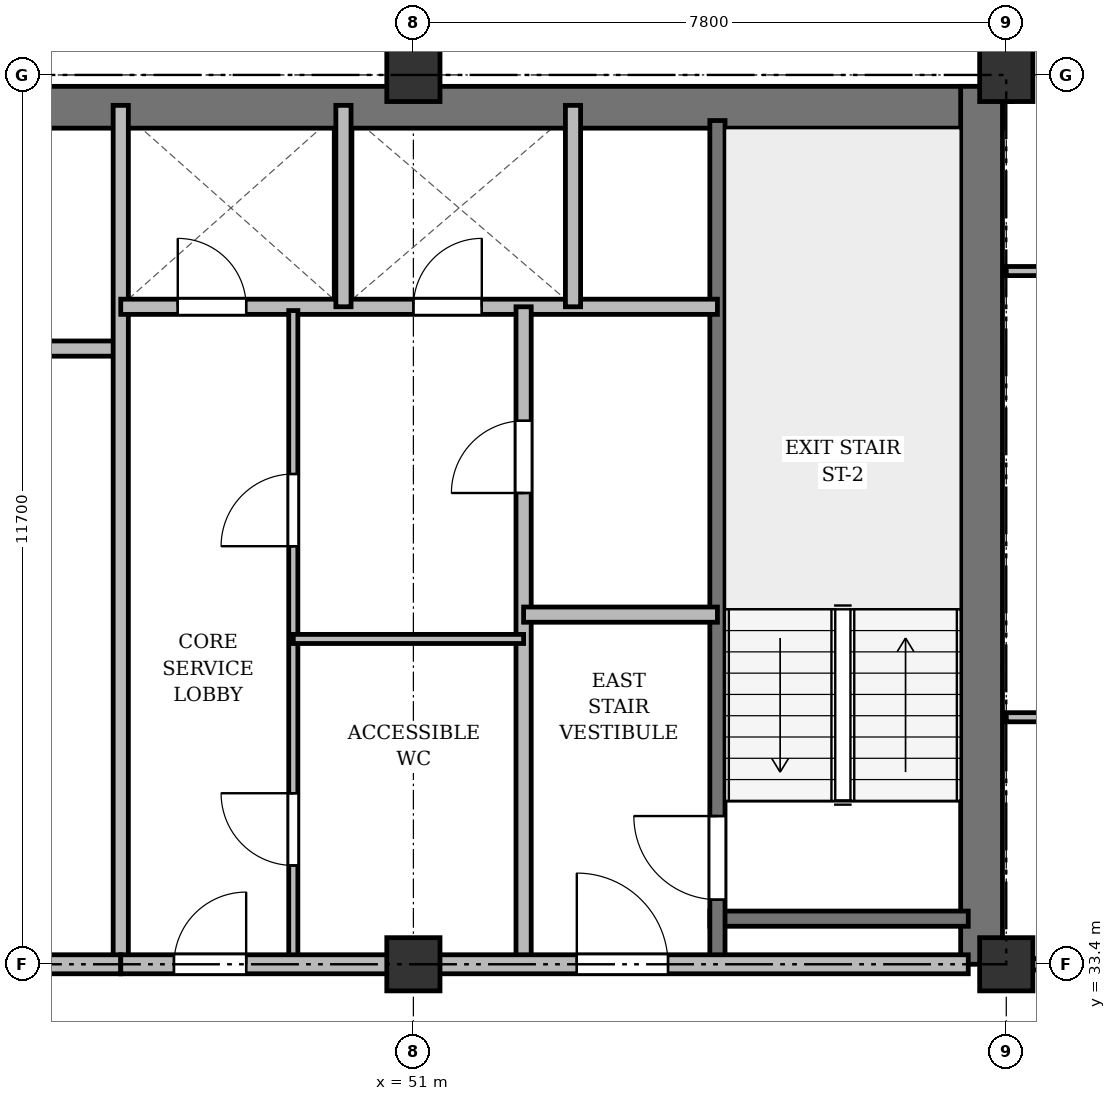
"""IFC4 building model, lengths in metres.
Left out: names, types, materials, properties, quantities, classifications, styles, units other than length and angle.
Written with IfcOpenShell. Run it as: python <this file> out.ifc"""

import sys

from ifc_helpers import new_model, si_unit, direction, frame, frame_2d, origin, origin_2d, place, context, subcontext, project, spatial, rectangle, extrude, source, transform, mapped, element, fill, save


model = new_model("IFC4")
c1 = context("Model", 3, precision=1e-05, world=origin(), true_north=direction((0.0, 1.0)))
c2 = subcontext(c1, "Body", "Model", "MODEL_VIEW")
j1 = project(units=[si_unit("LENGTHUNIT", "METRE"), si_unit("PLANEANGLEUNIT", "RADIAN")], contexts=[c1])
p1 = place(None, origin())
s1 = spatial("IfcSite", under=j1, at=p1, CompositionType="ELEMENT")
p2 = place(p1, origin())
s2 = spatial("IfcBuilding", under=s1, at=p2, CompositionType="ELEMENT")
p3 = place(p2, frame((0.0, 0.0, 160.9)))
s3 = spatial("IfcBuildingStorey", under=s2, at=p3, CompositionType="ELEMENT", Elevation=160.9)
m1 = source(origin(), c2, "Body", "SweptSolid", [
    extrude(rectangle(XDim=0.7, YDim=0.7, at=origin_2d()), origin(), (0.0, 0.0, 1.0), 3.6),
])
for number, where, z_axis, x_axis in (
    (1, (51.0, 33.4, 0.0), (0.0, 0.0, 1.0), (1.0, 0.0, 0.0)),
    (2, (51.0, 45.1, 0.0), (0.0, 0.0, 1.0), (1.0, 0.0, 0.0)),
    (3, (58.8, 33.4, 0.0), (0.0, 0.0, 1.0), (1.0, 0.0, 0.0)),
    (4, (58.8, 45.1, 0.0), (0.0, 0.0, 1.0), (1.0, 0.0, 0.0)),
):
    element("IfcColumn", number, at=place(p3, frame(where, z_axis=z_axis, x_axis=x_axis)), inside=s3, PredefinedType="COLUMN", context=c2, shape_type="MappedRepresentation", body=[
        mapped(m1, transform((0.0, 0.0, 0.0), x_axis=(1.0, 0.0, 0.0), y_axis=(0.0, 1.0, 0.0), z_axis=(0.0, 0.0, 1.0), scale=1.0)),
    ])
p4 = place(p3, frame((15.65, 44.675, 0.0), z_axis=(0.0, 0.0, 1.0), x_axis=(1.0, 0.0, 0.0)))
e5 = element("IfcWall", 5, at=p4, inside=s3, PredefinedType="SHEAR", context=c2, shape_type="SweptSolid", body=[
    extrude(rectangle(XDim=43.1, YDim=0.55, at=frame_2d((21.55, 0.0))), origin(), (0.0, 0.0, 1.0), 3.35),
])
p5 = place(p3, frame((58.475, 33.4, 0.0), z_axis=(0.0, 0.0, 1.0), x_axis=(0.0, 1.0, 0.0)))
e6 = element("IfcWall", 6, at=p5, inside=s3, PredefinedType="SHEAR", context=c2, shape_type="SweptSolid", body=[
    extrude(rectangle(XDim=11.55, YDim=0.55, at=frame_2d((5.775, 0.0))), origin(), (0.0, 0.0, 1.0), 3.35),
])
p6 = place(p3, frame((54.9, 34.0, 0.0), z_axis=(0.0, 0.0, 1.0), x_axis=(1.0, 0.0, 0.0)))
e7 = element("IfcWall", 7, at=p6, inside=s3, PredefinedType="SHEAR", context=c2, shape_type="SweptSolid", body=[
    extrude(rectangle(XDim=3.4, YDim=0.2, at=frame_2d((1.7, 0.0))), origin(), (0.0, 0.0, 1.0), 3.35),
])
p7 = place(p3, frame((55.0, 33.4, 0.0), z_axis=(0.0, 0.0, 1.0), x_axis=(0.0, 1.0, 0.0)))
e8 = element("IfcWall", 8, at=p7, inside=s3, PredefinedType="SHEAR", context=c2, shape_type="SweptSolid", body=[
    extrude(rectangle(XDim=11.1, YDim=0.2, at=frame_2d((5.55, 0.0))), origin(), (0.0, 0.0, 1.0), 3.35),
])
p8 = place(p7, frame((0.85, 0.0, 0.0)))
e9 = element("IfcOpeningElement", 9, at=p8, cuts=e8, PredefinedType="OPENING", context=c2, shape_type="SweptSolid", body=[
    extrude(rectangle(XDim=1.1, YDim=2.15, at=frame_2d((0.55, 1.075))), frame((0.0, 0.11, 0.0), z_axis=(0.0, -1.0, 0.0), x_axis=(1.0, 0.0, 0.0)), (0.0, 0.0, 1.0), 0.22),
])
p9 = place(p3, frame((40.25, 41.5, 0.0), z_axis=(0.0, 0.0, 1.0), x_axis=(1.0, 0.0, 0.0)))
e10 = element("IfcWall", 10, at=p9, inside=s3, PredefinedType="SOLIDWALL", context=c2, shape_type="SweptSolid", body=[
    extrude(rectangle(XDim=6.9, YDim=0.2, at=frame_2d((3.45, 0.0))), origin(), (0.0, 0.0, 1.0), 2.85),
])
p10 = place(p3, frame((47.15, 33.4, 0.0), z_axis=(0.0, 0.0, 1.0), x_axis=(0.0, 1.0, 0.0)))
e11 = element("IfcWall", 11, at=p10, inside=s3, PredefinedType="SOLIDWALL", context=c2, shape_type="SweptSolid", body=[
    extrude(rectangle(XDim=11.3, YDim=0.2, at=frame_2d((5.65, 0.0))), origin(), (0.0, 0.0, 1.0), 2.75),
])
p11 = place(p3, frame((33.3, 33.4, 0.0), z_axis=(0.0, 0.0, 1.0), x_axis=(1.0, 0.0, 0.0)))
e12 = element("IfcWall", 12, at=p11, inside=s3, PredefinedType="PARTITIONING", context=c2, shape_type="SweptSolid", body=[
    extrude(rectangle(XDim=13.85, YDim=0.25, at=frame_2d((6.925, 0.0))), origin(), (0.0, 0.0, 1.0), 2.75),
])
p12 = place(p11, frame((4.2, 0.0, 0.0)))
e13 = element("IfcOpeningElement", 13, at=p12, cuts=e12, PredefinedType="OPENING", context=c2, shape_type="SweptSolid", body=[
    extrude(rectangle(XDim=1.6, YDim=2.2, at=frame_2d((0.8, 1.1))), frame((0.0, 0.135, 0.0), z_axis=(0.0, -1.0, 0.0), x_axis=(1.0, 0.0, 0.0)), (0.0, 0.0, 1.0), 0.27),
])
p13 = place(p3, frame((47.15, 42.05, 0.0), z_axis=(0.0, 0.0, 1.0), x_axis=(1.0, 0.0, 0.0)))
e14 = element("IfcWall", 14, at=p13, inside=s3, PredefinedType="SOLIDWALL", context=c2, shape_type="SweptSolid", body=[
    extrude(rectangle(XDim=7.85, YDim=0.2, at=frame_2d((3.925, 0.0))), origin(), (0.0, 0.0, 1.0), 2.85),
])
p14 = place(p13, frame((0.75, 0.0, 0.0)))
e15 = element("IfcOpeningElement", 15, at=p14, cuts=e14, PredefinedType="OPENING", context=c2, shape_type="SweptSolid", body=[
    extrude(rectangle(XDim=0.9, YDim=2.1, at=frame_2d((0.45, 1.05))), frame((0.0, 0.11, 0.0), z_axis=(0.0, -1.0, 0.0), x_axis=(1.0, 0.0, 0.0)), (0.0, 0.0, 1.0), 0.22),
])
p15 = place(p13, frame((3.85, 0.0, 0.0)))
e16 = element("IfcOpeningElement", 16, at=p15, cuts=e14, PredefinedType="OPENING", context=c2, shape_type="SweptSolid", body=[
    extrude(rectangle(XDim=0.9, YDim=2.1, at=frame_2d((0.45, 1.05))), frame((0.0, 0.11, 0.0), z_axis=(0.0, -1.0, 0.0), x_axis=(1.0, 0.0, 0.0)), (0.0, 0.0, 1.0), 0.22),
])
for number, where, z_axis, x_axis in (
    (17, (50.08, 42.05, 0.0), (0.0, 0.0, 1.0), (0.0, 1.0, 0.0)),
    (18, (53.1, 42.05, 0.0), (0.0, 0.0, 1.0), (0.0, 1.0, 0.0)),
):
    element("IfcWall", number, at=place(p3, frame(where, z_axis=z_axis, x_axis=x_axis)), inside=s3, PredefinedType="SOLIDWALL", context=c2, shape_type="SweptSolid", body=[
        extrude(rectangle(XDim=2.65, YDim=0.2, at=frame_2d((1.325, 0.0))), origin(), (0.0, 0.0, 1.0), 3.35),
    ])
p16 = place(p3, frame((52.45, 33.4, 0.0), z_axis=(0.0, 0.0, 1.0), x_axis=(0.0, 1.0, 0.0)))
e19 = element("IfcWall", 19, at=p16, inside=s3, PredefinedType="PARTITIONING", context=c2, shape_type="SweptSolid", body=[
    extrude(rectangle(XDim=8.65, YDim=0.2, at=frame_2d((4.325, 0.0))), origin(), (0.0, 0.0, 1.0), 2.75),
])
p17 = place(p16, frame((6.2, 0.0, 0.0)))
e20 = element("IfcOpeningElement", 20, at=p17, cuts=e19, PredefinedType="OPENING", context=c2, shape_type="SweptSolid", body=[
    extrude(rectangle(XDim=0.95, YDim=2.15, at=frame_2d((0.475, 1.075))), frame((0.0, 0.11, 0.0), z_axis=(0.0, -1.0, 0.0), x_axis=(1.0, 0.0, 0.0)), (0.0, 0.0, 1.0), 0.22),
])
p18 = place(p3, frame((52.45, 38.0, 0.0), z_axis=(0.0, 0.0, 1.0), x_axis=(1.0, 0.0, 0.0)))
e21 = element("IfcWall", 21, at=p18, inside=s3, PredefinedType="PARTITIONING", context=c2, shape_type="SweptSolid", body=[
    extrude(rectangle(XDim=2.55, YDim=0.2, at=frame_2d((1.275, 0.0))), origin(), (0.0, 0.0, 1.0), 3.35),
])
p19 = place(p3, frame((49.42, 33.4, 0.0), z_axis=(0.0, 0.0, 1.0), x_axis=(0.0, 1.0, 0.0)))
e22 = element("IfcWall", 22, at=p19, inside=s3, PredefinedType="PARTITIONING", context=c2, shape_type="SweptSolid", body=[
    extrude(rectangle(XDim=8.6, YDim=0.12, at=frame_2d((4.3, 0.0))), origin(), (0.0, 0.0, 1.0), 2.75),
])
p20 = place(p19, frame((1.3, 0.0, 0.0)))
e23 = element("IfcOpeningElement", 23, at=p20, cuts=e22, PredefinedType="OPENING", context=c2, shape_type="SweptSolid", body=[
    extrude(rectangle(XDim=0.95, YDim=2.15, at=frame_2d((0.475, 1.075))), frame((0.0, 0.07, 0.0), z_axis=(0.0, -1.0, 0.0), x_axis=(1.0, 0.0, 0.0)), (0.0, 0.0, 1.0), 0.14),
])
p21 = place(p19, frame((5.5, 0.0, 0.0)))
e24 = element("IfcOpeningElement", 24, at=p21, cuts=e22, PredefinedType="OPENING", context=c2, shape_type="SweptSolid", body=[
    extrude(rectangle(XDim=0.95, YDim=2.15, at=frame_2d((0.475, 1.075))), frame((0.0, 0.07, 0.0), z_axis=(0.0, -1.0, 0.0), x_axis=(1.0, 0.0, 0.0)), (0.0, 0.0, 1.0), 0.14),
])
p22 = place(p3, frame((49.42, 37.68, 0.0), z_axis=(0.0, 0.0, 1.0), x_axis=(1.0, 0.0, 0.0)))
e25 = element("IfcWall", 25, at=p22, inside=s3, PredefinedType="PARTITIONING", context=c2, shape_type="SweptSolid", body=[
    extrude(rectangle(XDim=3.03, YDim=0.12, at=frame_2d((1.515, 0.0))), origin(), (0.0, 0.0, 1.0), 2.85),
])
p23 = place(p3, frame((47.15, 33.4, 0.0), z_axis=(0.0, 0.0, 1.0), x_axis=(1.0, 0.0, 0.0)))
e26 = element("IfcWall", 26, at=p23, inside=s3, PredefinedType="PARTITIONING", context=c2, shape_type="SweptSolid", body=[
    extrude(rectangle(XDim=11.15, YDim=0.25, at=frame_2d((5.575, 0.0))), origin(), (0.0, 0.0, 1.0), 2.75),
])
p24 = place(p23, frame((0.7, 0.0, 0.0)))
e27 = element("IfcOpeningElement", 27, at=p24, cuts=e26, PredefinedType="OPENING", context=c2, shape_type="SweptSolid", body=[
    extrude(rectangle(XDim=0.95, YDim=2.15, at=frame_2d((0.475, 1.075))), frame((0.0, 0.135, 0.0), z_axis=(0.0, -1.0, 0.0), x_axis=(1.0, 0.0, 0.0)), (0.0, 0.0, 1.0), 0.27),
])
p25 = place(p23, frame((6.0, 0.0, 0.0)))
e28 = element("IfcOpeningElement", 28, at=p25, cuts=e26, PredefinedType="OPENING", context=c2, shape_type="SweptSolid", body=[
    extrude(rectangle(XDim=1.2, YDim=2.15, at=frame_2d((0.6, 1.075))), frame((0.0, 0.135, 0.0), z_axis=(0.0, -1.0, 0.0), x_axis=(1.0, 0.0, 0.0)), (0.0, 0.0, 1.0), 0.27),
])
p26 = place(p3, frame((58.8, 36.65, 0.0), z_axis=(0.0, 0.0, 1.0), x_axis=(1.0, 0.0, 0.0)))
e29 = element("IfcWall", 29, at=p26, inside=s3, PredefinedType="PARTITIONING", context=c2, shape_type="SweptSolid", body=[
    extrude(rectangle(XDim=2.45, YDim=0.12, at=frame_2d((1.225, 0.0))), origin(), (0.0, 0.0, 1.0), 2.85),
])
p27 = place(p3, frame((58.8, 42.52, 0.0), z_axis=(0.0, 0.0, 1.0), x_axis=(1.0, 0.0, 0.0)))
e30 = element("IfcWall", 30, at=p27, inside=s3, PredefinedType="PARTITIONING", context=c2, shape_type="SweptSolid", body=[
    extrude(rectangle(XDim=3.775, YDim=0.12, at=frame_2d((1.887, 0.0))), origin(), (0.0, 0.0, 1.0), 2.85),
])
p28 = place(p27, frame((1.506, 0.0, 0.0)))
e31 = element("IfcOpeningElement", 31, at=p28, cuts=e30, PredefinedType="OPENING", context=c2, shape_type="SweptSolid", body=[
    extrude(rectangle(XDim=0.95, YDim=2.15, at=frame_2d((0.475, 1.075))), frame((0.0, 0.07, 0.0), z_axis=(0.0, -1.0, 0.0), x_axis=(1.0, 0.0, 0.0)), (0.0, 0.0, 1.0), 0.14),
])
p29 = place(p3, frame((58.8, 33.4, 0.0), z_axis=(0.0, 0.0, 1.0), x_axis=(1.0, 0.0, 0.0)))
e32 = element("IfcWall", 32, at=p29, inside=s3, PredefinedType="PARTITIONING", context=c2, shape_type="SweptSolid", body=[
    extrude(rectangle(XDim=7.55, YDim=0.15, at=frame_2d((3.775, 0.0))), origin(), (0.0, 0.0, 1.0), 2.75),
])
p30 = place(p29, frame((4.375, 0.0, 0.0)))
e33 = element("IfcOpeningElement", 33, at=p30, cuts=e32, PredefinedType="OPENING", context=c2, shape_type="SweptSolid", body=[
    extrude(rectangle(XDim=0.95, YDim=2.15, at=frame_2d((0.475, 1.075))), frame((0.0, 0.085, 0.0), z_axis=(0.0, -1.0, 0.0), x_axis=(1.0, 0.0, 0.0)), (0.0, 0.0, 1.0), 0.17),
])
p31 = place(p3, frame((58.8, 44.75, 0.0), z_axis=(0.0, 0.0, 1.0), x_axis=(0.0, 1.0, 0.0)))
e34 = element("IfcWall", 34, at=p31, inside=s3, PredefinedType="PARTITIONING", context=c2, shape_type="SweptSolid", body=[
    extrude(rectangle(XDim=3.61, YDim=0.15, at=frame_2d((1.805, 0.0))), origin(), (0.0, 0.0, 1.0), 2.85),
])
p32 = place(p31, frame((1.1, 0.0, 0.0)))
e35 = element("IfcOpeningElement", 35, at=p32, cuts=e34, PredefinedType="OPENING", context=c2, shape_type="SweptSolid", body=[
    extrude(rectangle(XDim=0.95, YDim=2.15, at=frame_2d((0.475, 1.075))), frame((0.0, 0.085, 0.0), z_axis=(0.0, -1.0, 0.0), x_axis=(1.0, 0.0, 0.0)), (0.0, 0.0, 1.0), 0.17),
])
m2 = source(origin(), c2, "Body", "SweptSolid", [
    extrude(rectangle(XDim=1.1, YDim=2.15, at=frame_2d((0.55, 1.075))), frame((0.0, 0.025, 0.0), z_axis=(0.0, -1.0, 0.0), x_axis=(1.0, 0.0, 0.0)), (0.0, 0.0, 1.0), 0.05),
])
p33 = place(p8, origin())
e36 = element("IfcDoor", 36, at=p33, inside=s3, OperationType="SINGLE_SWING_RIGHT", PredefinedType="DOOR", context=c2, shape_type="MappedRepresentation", body=[
    mapped(m2, transform((0.0, 0.0, 0.0), x_axis=(1.0, 0.0, 0.0), y_axis=(0.0, 1.0, 0.0), z_axis=(0.0, 0.0, 1.0), scale=1.0)),
])
fill(e9, e36)
m3 = source(origin(), c2, "Body", "SweptSolid", [
    extrude(rectangle(XDim=0.9, YDim=2.1, at=frame_2d((0.45, 1.05))), frame((0.0, 0.025, 0.0), z_axis=(0.0, -1.0, 0.0), x_axis=(1.0, 0.0, 0.0)), (0.0, 0.0, 1.0), 0.05),
])
p34 = place(p14, origin())
e37 = element("IfcDoor", 37, at=p34, inside=s3, OperationType="SINGLE_SWING_LEFT", PredefinedType="DOOR", context=c2, shape_type="MappedRepresentation", body=[
    mapped(m3, transform((0.0, 0.0, 0.0), x_axis=(1.0, 0.0, 0.0), y_axis=(0.0, 1.0, 0.0), z_axis=(0.0, 0.0, 1.0), scale=1.0)),
])
fill(e15, e37)
p35 = place(p15, origin())
e38 = element("IfcDoor", 38, at=p35, inside=s3, OperationType="SINGLE_SWING_RIGHT", PredefinedType="DOOR", context=c2, shape_type="MappedRepresentation", body=[
    mapped(m3, transform((0.0, 0.0, 0.0), x_axis=(1.0, 0.0, 0.0), y_axis=(0.0, 1.0, 0.0), z_axis=(0.0, 0.0, 1.0), scale=1.0)),
])
fill(e16, e38)
m4 = source(origin(), c2, "Body", "SweptSolid", [
    extrude(rectangle(XDim=0.95, YDim=2.15, at=frame_2d((0.475, 1.075))), frame((0.0, 0.025, 0.0), z_axis=(0.0, -1.0, 0.0), x_axis=(1.0, 0.0, 0.0)), (0.0, 0.0, 1.0), 0.05),
])
p36 = place(p17, origin())
e39 = element("IfcDoor", 39, at=p36, inside=s3, OperationType="SINGLE_SWING_LEFT", PredefinedType="DOOR", context=c2, shape_type="MappedRepresentation", body=[
    mapped(m4, transform((0.0, 0.0, 0.0), x_axis=(1.0, 0.0, 0.0), y_axis=(0.0, 1.0, 0.0), z_axis=(0.0, 0.0, 1.0), scale=1.0)),
])
fill(e20, e39)
p37 = place(p20, origin())
e40 = element("IfcDoor", 40, at=p37, inside=s3, OperationType="SINGLE_SWING_RIGHT", PredefinedType="DOOR", context=c2, shape_type="MappedRepresentation", body=[
    mapped(m4, transform((0.0, 0.0, 0.0), x_axis=(1.0, 0.0, 0.0), y_axis=(0.0, 1.0, 0.0), z_axis=(0.0, 0.0, 1.0), scale=1.0)),
])
fill(e23, e40)
p38 = place(p21, origin())
e41 = element("IfcDoor", 41, at=p38, inside=s3, OperationType="SINGLE_SWING_LEFT", PredefinedType="DOOR", context=c2, shape_type="MappedRepresentation", body=[
    mapped(m4, transform((0.0, 0.0, 0.0), x_axis=(1.0, 0.0, 0.0), y_axis=(0.0, 1.0, 0.0), z_axis=(0.0, 0.0, 1.0), scale=1.0)),
])
fill(e24, e41)
p39 = place(p24, origin())
e42 = element("IfcDoor", 42, at=p39, inside=s3, OperationType="SINGLE_SWING_RIGHT", PredefinedType="DOOR", context=c2, shape_type="MappedRepresentation", body=[
    mapped(m4, transform((0.0, 0.0, 0.0), x_axis=(1.0, 0.0, 0.0), y_axis=(0.0, 1.0, 0.0), z_axis=(0.0, 0.0, 1.0), scale=1.0)),
])
fill(e27, e42)
m5 = source(origin(), c2, "Body", "SweptSolid", [
    extrude(rectangle(XDim=1.2, YDim=2.15, at=frame_2d((0.6, 1.075))), frame((0.0, 0.025, 0.0), z_axis=(0.0, -1.0, 0.0), x_axis=(1.0, 0.0, 0.0)), (0.0, 0.0, 1.0), 0.05),
])
p40 = place(p25, origin())
e43 = element("IfcDoor", 43, at=p40, inside=s3, OperationType="SINGLE_SWING_LEFT", PredefinedType="DOOR", context=c2, shape_type="MappedRepresentation", body=[
    mapped(m5, transform((0.0, 0.0, 0.0), x_axis=(1.0, 0.0, 0.0), y_axis=(0.0, 1.0, 0.0), z_axis=(0.0, 0.0, 1.0), scale=1.0)),
])
fill(e28, e43)
save(model, sys.argv[1])
